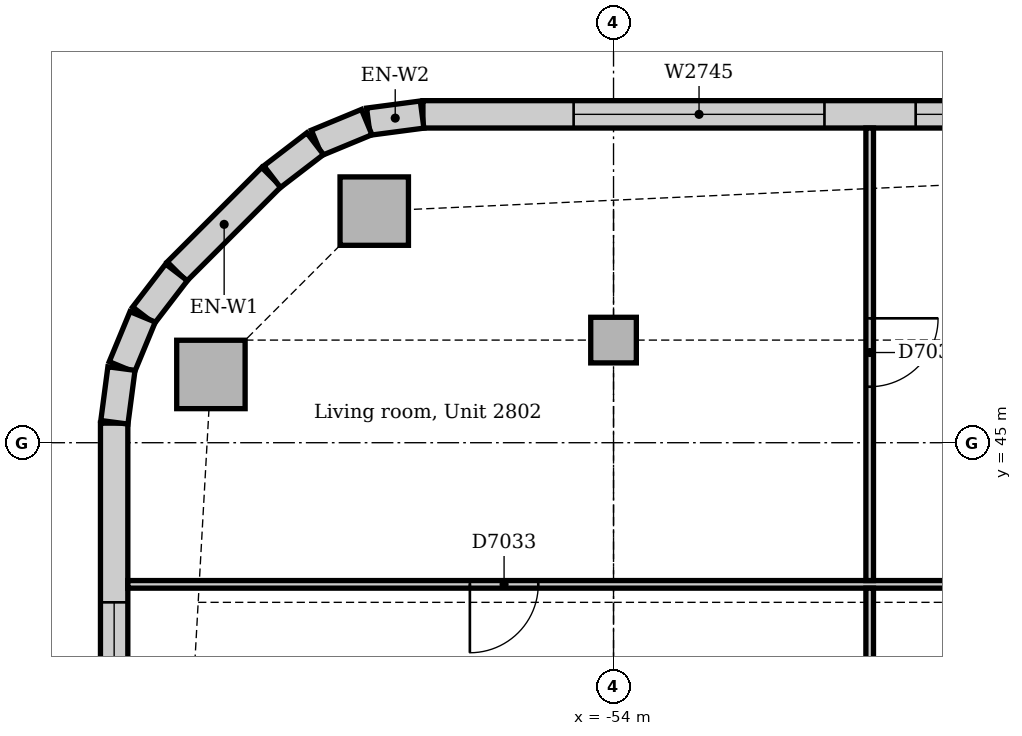
"""IFC4 building model, lengths in metres.
Left out: names, types, materials, properties, quantities, classifications, styles, units other than length and angle.
Written with IfcOpenShell. Run it as: python <this file> out.ifc"""

import sys

from ifc_helpers import new_model, si_unit, direction, frame, frame_2d, origin, origin_2d, place, context, subcontext, project, spatial, rectangle, extrude, element, fill, save


model = new_model("IFC4")
c1 = context("Model", 3, precision=1e-05, world=origin(), true_north=direction((0.0, 1.0)))
c2 = subcontext(c1, "Body", "Model", "MODEL_VIEW")
j1 = project(units=[si_unit("LENGTHUNIT", "METRE"), si_unit("PLANEANGLEUNIT", "RADIAN")], contexts=[c1])
p1 = place(None, origin())
s1 = spatial("IfcSite", under=j1, at=p1, CompositionType="ELEMENT")
p2 = place(p1, origin())
s2 = spatial("IfcBuilding", under=s1, at=p2, CompositionType="ELEMENT")
p3 = place(p2, frame((0.0, 0.0, 120.0)))
s3 = spatial("IfcBuildingStorey", under=s2, at=p3, CompositionType="ELEMENT", Elevation=120.0)
for number, where, z_axis, x_axis in (
    (1, (-57.148, 48.047, 0.0), (0.0, 0.0, 1.0), (1.0, 0.0, 0.0)),
    (2, (-59.297, 45.898, 0.0), (0.0, 0.0, 1.0), (1.0, 0.0, 0.0)),
):
    element("IfcColumn", number, at=place(p3, frame(where, z_axis=z_axis, x_axis=x_axis)), inside=s3, PredefinedType="COLUMN", context=c2, shape_type="SweptSolid", body=[
        extrude(rectangle(XDim=0.9, YDim=0.9, at=origin_2d()), origin(), (0.0, 0.0, 1.0), 3.85),
    ])
p4 = place(p3, frame((-54.0, 46.35, 0.0), z_axis=(0.0, 0.0, 1.0), x_axis=(1.0, 0.0, 0.0)))
e3 = element("IfcColumn", 3, at=p4, inside=s3, PredefinedType="COLUMN", context=c2, shape_type="SweptSolid", body=[
    extrude(rectangle(XDim=0.6, YDim=0.6, at=origin_2d()), origin(), (0.0, 0.0, 1.0), 3.85),
])
p5 = place(p3, frame((-31.243, 49.32, 0.0), z_axis=(0.0, 0.0, 1.0), x_axis=(-1.0, 0.0, 0.0)))
e4 = element("IfcWall", 4, at=p5, inside=s3, PredefinedType="STANDARD", context=c2, shape_type="SweptSolid", body=[
    extrude(rectangle(XDim=25.265, YDim=0.36, at=frame_2d((12.632, 0.0))), origin(), (0.0, 0.0, 1.0), 3.85),
])
p6 = place(p5, frame((1.982, 0.0, 0.9)))
e5 = element("IfcOpeningElement", 5, at=p6, cuts=e4, PredefinedType="OPENING", context=c2, shape_type="SweptSolid", body=[
    extrude(rectangle(XDim=3.3, YDim=1.6, at=frame_2d((1.65, 0.8))), frame((0.0, 0.19, 0.0), z_axis=(0.0, -1.0, 0.0), x_axis=(1.0, 0.0, 0.0)), (0.0, 0.0, 1.0), 0.38),
])
p7 = place(p5, frame((6.482, 0.0, 0.9)))
e6 = element("IfcOpeningElement", 6, at=p7, cuts=e4, PredefinedType="OPENING", context=c2, shape_type="SweptSolid", body=[
    extrude(rectangle(XDim=3.3, YDim=1.6, at=frame_2d((1.65, 0.8))), frame((0.0, 0.19, 0.0), z_axis=(0.0, -1.0, 0.0), x_axis=(1.0, 0.0, 0.0)), (0.0, 0.0, 1.0), 0.38),
])
p8 = place(p5, frame((10.982, 0.0, 0.9)))
e7 = element("IfcOpeningElement", 7, at=p8, cuts=e4, PredefinedType="OPENING", context=c2, shape_type="SweptSolid", body=[
    extrude(rectangle(XDim=3.3, YDim=1.6, at=frame_2d((1.65, 0.8))), frame((0.0, 0.19, 0.0), z_axis=(0.0, -1.0, 0.0), x_axis=(1.0, 0.0, 0.0)), (0.0, 0.0, 1.0), 0.38),
])
p9 = place(p5, frame((15.482, 0.0, 0.9)))
e8 = element("IfcOpeningElement", 8, at=p9, cuts=e4, PredefinedType="OPENING", context=c2, shape_type="SweptSolid", body=[
    extrude(rectangle(XDim=3.3, YDim=1.6, at=frame_2d((1.65, 0.8))), frame((0.0, 0.19, 0.0), z_axis=(0.0, -1.0, 0.0), x_axis=(1.0, 0.0, 0.0)), (0.0, 0.0, 1.0), 0.38),
])
p10 = place(p5, frame((19.982, 0.0, 0.9)))
e9 = element("IfcOpeningElement", 9, at=p10, cuts=e4, PredefinedType="OPENING", context=c2, shape_type="SweptSolid", body=[
    extrude(rectangle(XDim=3.3, YDim=1.6, at=frame_2d((1.65, 0.8))), frame((0.0, 0.19, 0.0), z_axis=(0.0, -1.0, 0.0), x_axis=(1.0, 0.0, 0.0)), (0.0, 0.0, 1.0), 0.38),
])
p11 = place(p3, frame((-58.501, 48.494, 0.0), z_axis=(0.0, 0.0, 1.0), x_axis=(-0.707106781187, -0.707106781187, 0.0)))
e10 = element("IfcWall", 10, at=p11, inside=s3, PredefinedType="STANDARD", context=c2, shape_type="SweptSolid", body=[
    extrude(rectangle(XDim=1.757, YDim=0.36, at=frame_2d((0.879, 0.0))), origin(), (0.0, 0.0, 1.0), 3.85),
])
p12 = place(p3, frame((-60.57, 45.257, 0.0), z_axis=(0.0, 0.0, 1.0), x_axis=(0.0, -1.0, 0.0)))
e11 = element("IfcWall", 11, at=p12, inside=s3, PredefinedType="STANDARD", context=c2, shape_type="SweptSolid", body=[
    extrude(rectangle(XDim=21.515, YDim=0.36, at=frame_2d((10.757, 0.0))), origin(), (0.0, 0.0, 1.0), 3.85),
])
p13 = place(p12, frame((2.357, 0.0, 0.9)))
e12 = element("IfcOpeningElement", 12, at=p13, cuts=e11, PredefinedType="OPENING", context=c2, shape_type="SweptSolid", body=[
    extrude(rectangle(XDim=3.3, YDim=1.6, at=frame_2d((1.65, 0.8))), frame((0.0, 0.19, 0.0), z_axis=(0.0, -1.0, 0.0), x_axis=(1.0, 0.0, 0.0)), (0.0, 0.0, 1.0), 0.38),
])
p14 = place(p12, frame((6.857, 0.0, 0.9)))
e13 = element("IfcOpeningElement", 13, at=p14, cuts=e11, PredefinedType="OPENING", context=c2, shape_type="SweptSolid", body=[
    extrude(rectangle(XDim=3.3, YDim=1.6, at=frame_2d((1.65, 0.8))), frame((0.0, 0.19, 0.0), z_axis=(0.0, -1.0, 0.0), x_axis=(1.0, 0.0, 0.0)), (0.0, 0.0, 1.0), 0.38),
])
p15 = place(p12, frame((11.357, 0.0, 0.9)))
e14 = element("IfcOpeningElement", 14, at=p15, cuts=e11, PredefinedType="OPENING", context=c2, shape_type="SweptSolid", body=[
    extrude(rectangle(XDim=3.3, YDim=1.6, at=frame_2d((1.65, 0.8))), frame((0.0, 0.19, 0.0), z_axis=(0.0, -1.0, 0.0), x_axis=(1.0, 0.0, 0.0)), (0.0, 0.0, 1.0), 0.38),
])
p16 = place(p12, frame((15.857, 0.0, 0.9)))
e15 = element("IfcOpeningElement", 15, at=p16, cuts=e11, PredefinedType="OPENING", context=c2, shape_type="SweptSolid", body=[
    extrude(rectangle(XDim=3.3, YDim=1.6, at=frame_2d((1.65, 0.8))), frame((0.0, 0.19, 0.0), z_axis=(0.0, -1.0, 0.0), x_axis=(1.0, 0.0, 0.0)), (0.0, 0.0, 1.0), 0.38),
])
for number, where, z_axis, x_axis in (
    (16, (-56.519, 49.317, 0.0), (0.0, 0.0, 1.0), (-0.991, -0.131, 0.0)),
    (17, (-57.247, 49.218, 0.0), (0.0, 0.0, 1.0), (-0.924, -0.383, 0.0)),
):
    element("IfcWall", number, at=place(p3, frame(where, z_axis=z_axis, x_axis=x_axis)), inside=s3, PredefinedType="STANDARD", context=c2, shape_type="SweptSolid", body=[
        extrude(rectangle(XDim=0.713, YDim=0.36, at=frame_2d((0.356, 0.0))), origin(), (0.0, 0.0, 1.0), 3.85),
    ])
for number, where, z_axis, x_axis in (
    (18, (-57.925, 48.934, 0.0), (0.0, 0.0, 1.0), (-0.793, -0.609, 0.0)),
    (19, (-59.75, 47.241, 0.0), (0.0, 0.0, 1.0), (-0.609, -0.793, 0.0)),
):
    element("IfcWall", number, at=place(p3, frame(where, z_axis=z_axis, x_axis=x_axis)), inside=s3, PredefinedType="STANDARD", context=c2, shape_type="SweptSolid", body=[
        extrude(rectangle(XDim=0.713, YDim=0.36, at=frame_2d((0.357, 0.0))), origin(), (0.0, 0.0, 1.0), 3.85),
    ])
for number, where, z_axis, x_axis in (
    (20, (-60.195, 46.656, 0.0), (0.0, 0.0, 1.0), (-0.383, -0.924, 0.0)),
    (21, (-60.474, 45.976, 0.0), (0.0, 0.0, 1.0), (-0.131, -0.991, 0.0)),
):
    element("IfcWall", number, at=place(p3, frame(where, z_axis=z_axis, x_axis=x_axis)), inside=s3, PredefinedType="STANDARD", context=c2, shape_type="SweptSolid", body=[
        extrude(rectangle(XDim=0.713, YDim=0.36, at=frame_2d((0.356, 0.0))), origin(), (0.0, 0.0, 1.0), 3.85),
    ])
p17 = place(p3, frame((-60.39, 43.136, 0.0), z_axis=(0.0, 0.0, 1.0), x_axis=(1.0, 0.0, 0.0)))
e22 = element("IfcWall", 22, at=p17, inside=s3, PredefinedType="PARTITIONING", context=c2, shape_type="SweptSolid", body=[
    extrude(rectangle(XDim=15.44, YDim=0.1, at=frame_2d((7.72, 0.0))), origin(), (0.0, 0.0, 1.0), 3.85),
])
p18 = place(p17, frame((4.5, 0.0, 0.0)))
e23 = element("IfcOpeningElement", 23, at=p18, cuts=e22, PredefinedType="OPENING", context=c2, shape_type="SweptSolid", body=[
    extrude(rectangle(XDim=0.9, YDim=2.1, at=frame_2d((0.45, 1.05))), frame((0.0, 0.06, 0.0), z_axis=(0.0, -1.0, 0.0), x_axis=(1.0, 0.0, 0.0)), (0.0, 0.0, 1.0), 0.12),
])
p19 = place(p17, frame((12.06, 0.0, 0.0)))
e24 = element("IfcOpeningElement", 24, at=p19, cuts=e22, PredefinedType="OPENING", context=c2, shape_type="SweptSolid", body=[
    extrude(rectangle(XDim=0.9, YDim=2.1, at=frame_2d((0.45, 1.05))), frame((0.0, 0.06, 0.0), z_axis=(0.0, -1.0, 0.0), x_axis=(1.0, 0.0, 0.0)), (0.0, 0.0, 1.0), 0.12),
])
p20 = place(p3, frame((-50.63, 39.25, 0.0), z_axis=(0.0, 0.0, 1.0), x_axis=(0.0, 1.0, 0.0)))
e25 = element("IfcWall", 25, at=p20, inside=s3, PredefinedType="PARTITIONING", context=c2, shape_type="SweptSolid", body=[
    extrude(rectangle(XDim=3.837, YDim=0.1, at=frame_2d((1.918, 0.0))), origin(), (0.0, 0.0, 1.0), 3.85),
])
p21 = place(p3, frame((-50.63, 43.187, 0.0), z_axis=(0.0, 0.0, 1.0), x_axis=(0.0, 1.0, 0.0)))
e26 = element("IfcWall", 26, at=p21, inside=s3, PredefinedType="PARTITIONING", context=c2, shape_type="SweptSolid", body=[
    extrude(rectangle(XDim=5.954, YDim=0.1, at=frame_2d((2.977, 0.0))), origin(), (0.0, 0.0, 1.0), 3.85),
])
p22 = place(p21, frame((2.55, 0.0, 0.0)))
e27 = element("IfcOpeningElement", 27, at=p22, cuts=e26, PredefinedType="OPENING", context=c2, shape_type="SweptSolid", body=[
    extrude(rectangle(XDim=0.9, YDim=2.1, at=frame_2d((0.45, 1.05))), frame((0.0, 0.06, 0.0), z_axis=(0.0, -1.0, 0.0), x_axis=(1.0, 0.0, 0.0)), (0.0, 0.0, 1.0), 0.12),
])
p23 = place(p9, origin())
e28 = element("IfcWindow", 28, at=p23, inside=s3, PartitioningType="SINGLE_PANEL", PredefinedType="WINDOW", context=c2, shape_type="SweptSolid", body=[
    extrude(rectangle(XDim=3.3, YDim=1.6, at=frame_2d((1.65, 0.8))), frame((0.0, 0.13, 0.0), z_axis=(0.0, -1.0, 0.0), x_axis=(1.0, 0.0, 0.0)), (0.0, 0.0, 1.0), 0.06),
])
fill(e8, e28)
p24 = place(p10, origin())
e29 = element("IfcWindow", 29, at=p24, inside=s3, PartitioningType="SINGLE_PANEL", PredefinedType="WINDOW", context=c2, shape_type="SweptSolid", body=[
    extrude(rectangle(XDim=3.3, YDim=1.6, at=frame_2d((1.65, 0.8))), frame((0.0, 0.13, 0.0), z_axis=(0.0, -1.0, 0.0), x_axis=(1.0, 0.0, 0.0)), (0.0, 0.0, 1.0), 0.06),
])
fill(e9, e29)
p25 = place(p13, origin())
e30 = element("IfcWindow", 30, at=p25, inside=s3, PartitioningType="SINGLE_PANEL", PredefinedType="WINDOW", context=c2, shape_type="SweptSolid", body=[
    extrude(rectangle(XDim=3.3, YDim=1.6, at=frame_2d((1.65, 0.8))), frame((0.0, 0.13, 0.0), z_axis=(0.0, -1.0, 0.0), x_axis=(1.0, 0.0, 0.0)), (0.0, 0.0, 1.0), 0.06),
])
fill(e12, e30)
p26 = place(p22, frame((0.9, 0.0, 0.0), z_axis=(0.0, 0.0, 1.0), x_axis=(-1.0, 0.0, 0.0)))
e31 = element("IfcDoor", 31, at=p26, inside=s3, OperationType="SINGLE_SWING_LEFT", PredefinedType="DOOR", context=c2, shape_type="SweptSolid", body=[
    extrude(rectangle(XDim=0.9, YDim=2.1, at=frame_2d((0.45, 1.05))), frame((0.0, 0.025, 0.0), z_axis=(0.0, -1.0, 0.0), x_axis=(1.0, 0.0, 0.0)), (0.0, 0.0, 1.0), 0.05),
])
fill(e27, e31)
p27 = place(p18, frame((0.9, 0.0, 0.0), z_axis=(0.0, 0.0, 1.0), x_axis=(-1.0, 0.0, 0.0)))
e32 = element("IfcDoor", 32, at=p27, inside=s3, OperationType="SINGLE_SWING_RIGHT", PredefinedType="DOOR", context=c2, shape_type="SweptSolid", body=[
    extrude(rectangle(XDim=0.9, YDim=2.1, at=frame_2d((0.45, 1.05))), frame((0.0, 0.025, 0.0), z_axis=(0.0, -1.0, 0.0), x_axis=(1.0, 0.0, 0.0)), (0.0, 0.0, 1.0), 0.05),
])
fill(e23, e32)
save(model, sys.argv[1])
